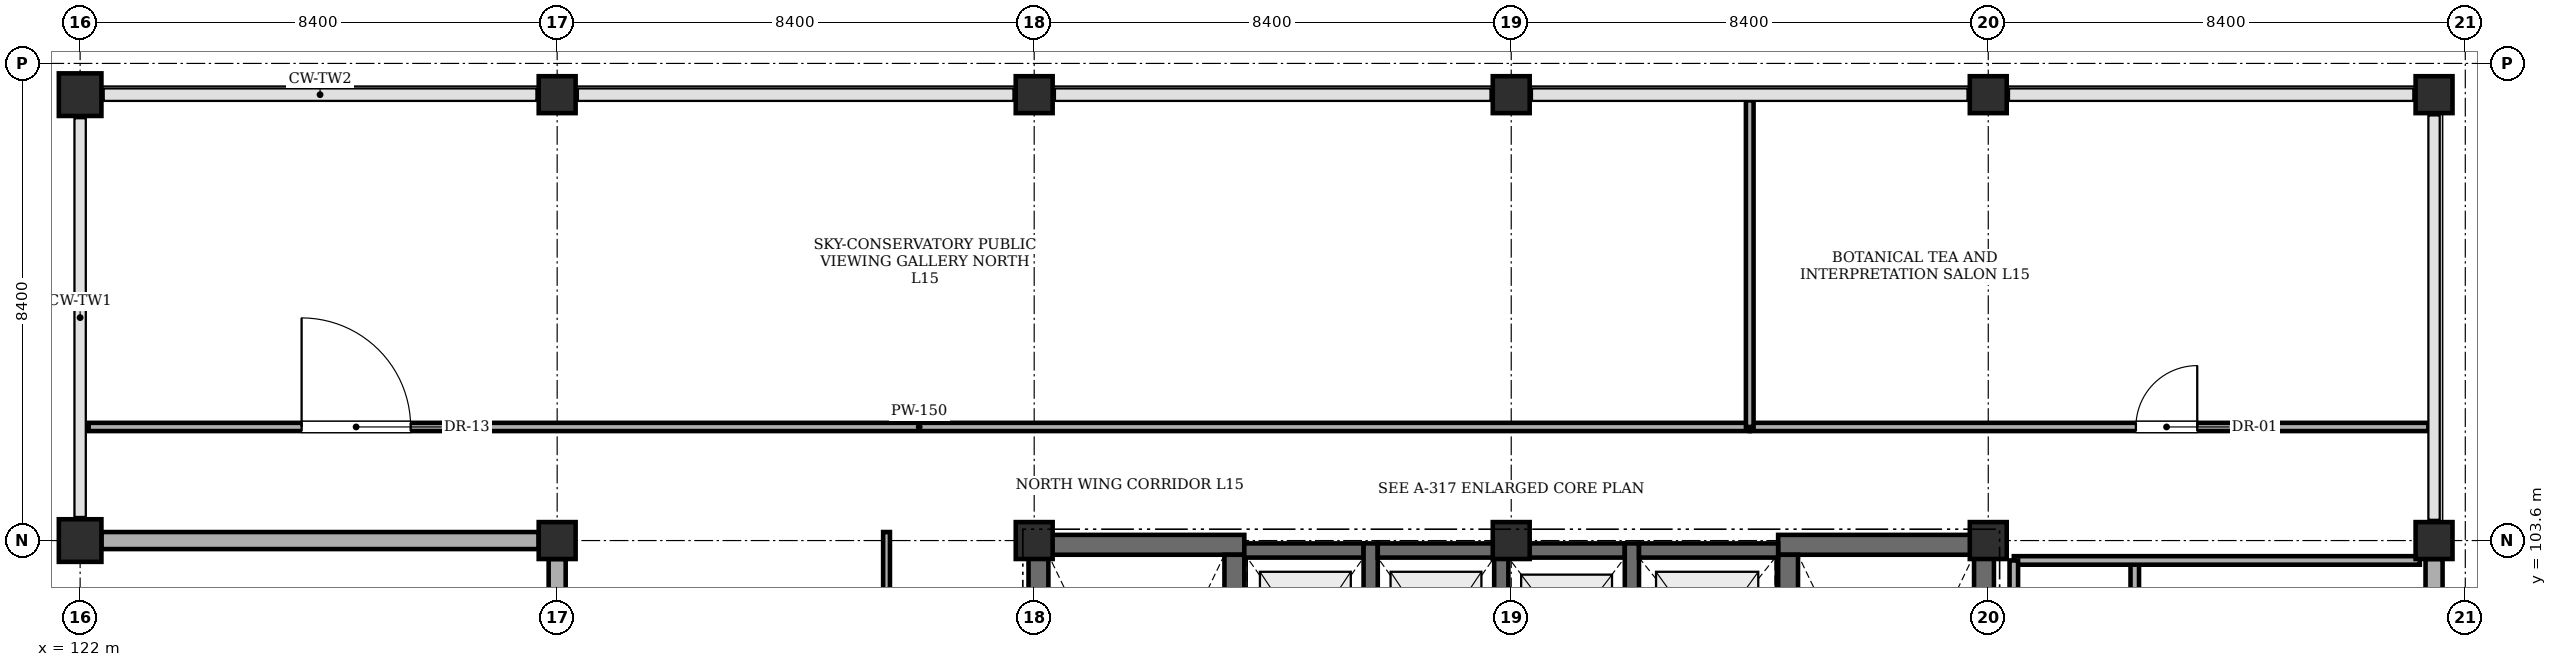
"""IFC4 building model, lengths in metres.
Left out: names, types, materials, properties, quantities, classifications, styles, units other than length and angle.
Written with IfcOpenShell. Run it as: python <this file> out.ifc"""

import sys

from ifc_helpers import new_model, si_unit, direction, frame, frame_2d, origin, origin_2d, place, context, subcontext, project, spatial, rectangle, extrude, element, fill, save


model = new_model("IFC4")
c1 = context("Model", 3, precision=1e-05, world=origin(), true_north=direction((0.0, 1.0)))
c2 = subcontext(c1, "Body", "Model", "MODEL_VIEW")
j1 = project(units=[si_unit("LENGTHUNIT", "METRE"), si_unit("PLANEANGLEUNIT", "RADIAN")], contexts=[c1])
p1 = place(None, origin())
s1 = spatial("IfcSite", under=j1, at=p1, CompositionType="ELEMENT")
p2 = place(p1, origin())
s2 = spatial("IfcBuilding", under=s1, at=p2, CompositionType="ELEMENT")
p3 = place(p2, frame((0.0, 0.0, 61.2)))
s3 = spatial("IfcBuildingStorey", under=s2, at=p3, CompositionType="ELEMENT", Elevation=61.2)
for number, where, z_axis, x_axis in (
    (1, (122.0, 103.6, 0.0), (0.0, 0.0, 1.0), (1.0, 0.0, 0.0)),
    (2, (122.0, 111.45, 0.0), (0.0, 0.0, 1.0), (1.0, 0.0, 0.0)),
):
    element("IfcColumn", number, at=place(p3, frame(where, z_axis=z_axis, x_axis=x_axis)), inside=s3, PredefinedType="COLUMN", context=c2, shape_type="SweptSolid", body=[
        extrude(rectangle(XDim=0.75, YDim=0.75, at=origin_2d()), origin(), (0.0, 0.0, 1.0), 4.28),
    ])
for number, where, z_axis, x_axis in (
    (3, (130.4, 103.6, 0.0), (0.0, 0.0, 1.0), (1.0, 0.0, 0.0)),
    (4, (130.4, 111.45, 0.0), (0.0, 0.0, 1.0), (1.0, 0.0, 0.0)),
    (5, (138.8, 103.6, 0.0), (0.0, 0.0, 1.0), (1.0, 0.0, 0.0)),
    (6, (138.8, 111.45, 0.0), (0.0, 0.0, 1.0), (1.0, 0.0, 0.0)),
    (7, (147.2, 103.6, 0.0), (0.0, 0.0, 1.0), (1.0, 0.0, 0.0)),
    (8, (147.2, 111.45, 0.0), (0.0, 0.0, 1.0), (1.0, 0.0, 0.0)),
    (9, (155.6, 103.6, 0.0), (0.0, 0.0, 1.0), (1.0, 0.0, 0.0)),
    (10, (155.6, 111.45, 0.0), (0.0, 0.0, 1.0), (1.0, 0.0, 0.0)),
    (11, (163.45, 103.6, 0.0), (0.0, 0.0, 1.0), (1.0, 0.0, 0.0)),
    (12, (163.45, 111.45, 0.0), (0.0, 0.0, 1.0), (1.0, 0.0, 0.0)),
):
    element("IfcColumn", number, at=place(p3, frame(where, z_axis=z_axis, x_axis=x_axis)), inside=s3, PredefinedType="COLUMN", context=c2, shape_type="SweptSolid", body=[
        extrude(rectangle(XDim=0.65, YDim=0.65, at=origin_2d()), origin(), (0.0, 0.0, 1.0), 4.28),
    ])
p4 = place(p3, frame((138.7, 103.525, 0.0), z_axis=(0.0, 0.0, 1.0), x_axis=(1.0, 0.0, 0.0)))
e13 = element("IfcWall", 13, at=p4, inside=s3, PredefinedType="SHEAR", context=c2, shape_type="SweptSolid", body=[
    extrude(rectangle(XDim=3.8, YDim=0.35, at=frame_2d((1.9, 0.0))), origin(), (0.0, 0.0, 1.0), 4.28),
])
p5 = place(p3, frame((138.875, 95.45, 0.0), z_axis=(0.0, 0.0, 1.0), x_axis=(0.0, 1.0, 0.0)))
e14 = element("IfcWall", 14, at=p5, inside=s3, PredefinedType="SHEAR", context=c2, shape_type="SweptSolid", body=[
    extrude(rectangle(XDim=7.9, YDim=0.35, at=frame_2d((3.95, 0.0))), origin(), (0.0, 0.0, 1.0), 4.28),
])
p6 = place(p3, frame((142.325, 95.45, 0.0), z_axis=(0.0, 0.0, 1.0), x_axis=(0.0, 1.0, 0.0)))
e15 = element("IfcWall", 15, at=p6, inside=s3, PredefinedType="SHEAR", context=c2, shape_type="SweptSolid", body=[
    extrude(rectangle(XDim=7.9, YDim=0.35, at=frame_2d((3.95, 0.0))), origin(), (0.0, 0.0, 1.0), 4.28),
])
p7 = place(p6, frame((0.22, 0.0, 0.0)))
e16 = element("IfcOpeningElement", 16, at=p7, cuts=e15, PredefinedType="OPENING", context=c2, shape_type="SweptSolid", body=[
    extrude(rectangle(XDim=1.15, YDim=2.15, at=frame_2d((0.575, 1.075))), frame((0.0, 0.185, 0.0), z_axis=(0.0, -1.0, 0.0), x_axis=(1.0, 0.0, 0.0)), (0.0, 0.0, 1.0), 0.37),
])
p8 = place(p3, frame((151.9, 103.525, 0.0), z_axis=(0.0, 0.0, 1.0), x_axis=(1.0, 0.0, 0.0)))
e17 = element("IfcWall", 17, at=p8, inside=s3, PredefinedType="SHEAR", context=c2, shape_type="SweptSolid", body=[
    extrude(rectangle(XDim=3.8, YDim=0.35, at=frame_2d((1.9, 0.0))), origin(), (0.0, 0.0, 1.0), 4.28),
])
p9 = place(p3, frame((152.075, 95.45, 0.0), z_axis=(0.0, 0.0, 1.0), x_axis=(0.0, 1.0, 0.0)))
e18 = element("IfcWall", 18, at=p9, inside=s3, PredefinedType="SHEAR", context=c2, shape_type="SweptSolid", body=[
    extrude(rectangle(XDim=7.9, YDim=0.35, at=frame_2d((3.95, 0.0))), origin(), (0.0, 0.0, 1.0), 4.28),
])
p10 = place(p9, frame((0.35, 0.0, 0.0)))
e19 = element("IfcOpeningElement", 19, at=p10, cuts=e18, PredefinedType="OPENING", context=c2, shape_type="SweptSolid", body=[
    extrude(rectangle(XDim=1.15, YDim=2.15, at=frame_2d((0.575, 1.075))), frame((0.0, 0.185, 0.0), z_axis=(0.0, -1.0, 0.0), x_axis=(1.0, 0.0, 0.0)), (0.0, 0.0, 1.0), 0.37),
])
p11 = place(p3, frame((155.525, 95.45, 0.0), z_axis=(0.0, 0.0, 1.0), x_axis=(0.0, 1.0, 0.0)))
e20 = element("IfcWall", 20, at=p11, inside=s3, PredefinedType="SHEAR", context=c2, shape_type="SweptSolid", body=[
    extrude(rectangle(XDim=7.9, YDim=0.35, at=frame_2d((3.95, 0.0))), origin(), (0.0, 0.0, 1.0), 4.28),
])
p12 = place(p3, frame((142.5, 103.425, 0.0), z_axis=(0.0, 0.0, 1.0), x_axis=(1.0, 0.0, 0.0)))
e21 = element("IfcWall", 21, at=p12, inside=s3, PredefinedType="SHEAR", context=c2, shape_type="SweptSolid", body=[
    extrude(rectangle(XDim=2.1, YDim=0.25, at=frame_2d((1.05, 0.0))), origin(), (0.0, 0.0, 1.0), 4.28),
])
p13 = place(p3, frame((144.725, 100.15, 0.0), z_axis=(0.0, 0.0, 1.0), x_axis=(0.0, 1.0, 0.0)))
e22 = element("IfcWall", 22, at=p13, inside=s3, PredefinedType="SHEAR", context=c2, shape_type="SweptSolid", body=[
    extrude(rectangle(XDim=3.4, YDim=0.25, at=frame_2d((1.7, 0.0))), origin(), (0.0, 0.0, 1.0), 4.28),
])
p14 = place(p3, frame((144.85, 103.425, 0.0), z_axis=(0.0, 0.0, 1.0), x_axis=(1.0, 0.0, 0.0)))
e23 = element("IfcWall", 23, at=p14, inside=s3, PredefinedType="SHEAR", context=c2, shape_type="SweptSolid", body=[
    extrude(rectangle(XDim=2.05, YDim=0.25, at=frame_2d((1.025, 0.0))), origin(), (0.0, 0.0, 1.0), 4.28),
])
p15 = place(p3, frame((147.025, 100.15, 0.0), z_axis=(0.0, 0.0, 1.0), x_axis=(0.0, 1.0, 0.0)))
e24 = element("IfcWall", 24, at=p15, inside=s3, PredefinedType="SHEAR", context=c2, shape_type="SweptSolid", body=[
    extrude(rectangle(XDim=3.4, YDim=0.25, at=frame_2d((1.7, 0.0))), origin(), (0.0, 0.0, 1.0), 4.28),
])
p16 = place(p3, frame((147.15, 103.425, 0.0), z_axis=(0.0, 0.0, 1.0), x_axis=(1.0, 0.0, 0.0)))
e25 = element("IfcWall", 25, at=p16, inside=s3, PredefinedType="SHEAR", context=c2, shape_type="SweptSolid", body=[
    extrude(rectangle(XDim=2.05, YDim=0.25, at=frame_2d((1.025, 0.0))), origin(), (0.0, 0.0, 1.0), 4.28),
])
p17 = place(p3, frame((149.325, 100.35, 0.0), z_axis=(0.0, 0.0, 1.0), x_axis=(0.0, 1.0, 0.0)))
e26 = element("IfcWall", 26, at=p17, inside=s3, PredefinedType="SHEAR", context=c2, shape_type="SweptSolid", body=[
    extrude(rectangle(XDim=3.2, YDim=0.25, at=frame_2d((1.6, 0.0))), origin(), (0.0, 0.0, 1.0), 4.28),
])
p18 = place(p3, frame((149.45, 103.425, 0.0), z_axis=(0.0, 0.0, 1.0), x_axis=(1.0, 0.0, 0.0)))
e27 = element("IfcWall", 27, at=p18, inside=s3, PredefinedType="SHEAR", context=c2, shape_type="SweptSolid", body=[
    extrude(rectangle(XDim=2.45, YDim=0.25, at=frame_2d((1.225, 0.0))), origin(), (0.0, 0.0, 1.0), 4.28),
])
p19 = place(p3, frame((163.45, 103.275, 0.0), z_axis=(0.0, 0.0, 1.0), x_axis=(0.0, -1.0, 0.0)))
e28 = element("IfcWall", 28, at=p19, inside=s3, PredefinedType="STANDARD", context=c2, shape_type="SweptSolid", body=[
    extrude(rectangle(XDim=7.75, YDim=0.3, at=frame_2d((3.875, 0.0))), origin(), (0.0, 0.0, 1.0), 3.58),
])
p20 = place(p19, frame((1.15, 0.0, 1.1)))
e29 = element("IfcOpeningElement", 29, at=p20, cuts=e28, PredefinedType="OPENING", context=c2, shape_type="SweptSolid", body=[
    extrude(rectangle(XDim=1.4, YDim=1.4, at=frame_2d((0.7, 0.7))), frame((0.0, 0.16, 0.0), z_axis=(0.0, -1.0, 0.0), x_axis=(1.0, 0.0, 0.0)), (0.0, 0.0, 1.0), 0.32),
])
p21 = place(p3, frame((130.4, 95.525, 0.0), z_axis=(0.0, 0.0, 1.0), x_axis=(0.0, 1.0, 0.0)))
e30 = element("IfcWall", 30, at=p21, inside=s3, PredefinedType="STANDARD", context=c2, shape_type="SweptSolid", body=[
    extrude(rectangle(XDim=7.75, YDim=0.3, at=frame_2d((3.875, 0.0))), origin(), (0.0, 0.0, 1.0), 3.58),
])
p22 = place(p21, frame((2.4, 0.0, 1.0)))
e31 = element("IfcOpeningElement", 31, at=p22, cuts=e30, PredefinedType="OPENING", context=c2, shape_type="SweptSolid", body=[
    extrude(rectangle(XDim=1.8, YDim=1.8, at=frame_2d((0.9, 0.9))), frame((0.0, 0.16, 0.0), z_axis=(0.0, -1.0, 0.0), x_axis=(1.0, 0.0, 0.0)), (0.0, 0.0, 1.0), 0.32),
])
p23 = place(p3, frame((130.075, 103.6, 0.0), z_axis=(0.0, 0.0, 1.0), x_axis=(-1.0, 0.0, 0.0)))
e32 = element("IfcWall", 32, at=p23, inside=s3, PredefinedType="STANDARD", context=c2, shape_type="SweptSolid", body=[
    extrude(rectangle(XDim=7.7, YDim=0.3, at=frame_2d((3.85, 0.0))), origin(), (0.0, 0.0, 1.0), 3.58),
])
p24 = place(p3, frame((158.18, 94.68, 0.0), z_axis=(0.0, 0.0, 1.0), x_axis=(0.0, 1.0, 0.0)))
e33 = element("IfcWall", 33, at=p24, inside=s3, PredefinedType="PARTITIONING", context=c2, shape_type="SweptSolid", body=[
    extrude(rectangle(XDim=8.57, YDim=0.15, at=frame_2d((4.285, 0.0))), origin(), (0.0, 0.0, 1.0), 4.28),
])
p25 = place(p24, frame((0.8, 0.0, 0.0)))
e34 = element("IfcOpeningElement", 34, at=p25, cuts=e33, PredefinedType="OPENING", context=c2, shape_type="SweptSolid", body=[
    extrude(rectangle(XDim=1.0, YDim=2.12, at=frame_2d((0.5, 1.06))), frame((0.0, 0.085, 0.0), z_axis=(0.0, -1.0, 0.0), x_axis=(1.0, 0.0, 0.0)), (0.0, 0.0, 1.0), 0.17),
])
p26 = place(p24, frame((3.5, 0.0, 0.0)))
e35 = element("IfcOpeningElement", 35, at=p26, cuts=e33, PredefinedType="OPENING", context=c2, shape_type="SweptSolid", body=[
    extrude(rectangle(XDim=0.92, YDim=2.1, at=frame_2d((0.46, 1.05))), frame((0.0, 0.085, 0.0), z_axis=(0.0, -1.0, 0.0), x_axis=(1.0, 0.0, 0.0)), (0.0, 0.0, 1.0), 0.17),
])
p27 = place(p24, frame((6.4, 0.0, 0.0)))
e36 = element("IfcOpeningElement", 36, at=p27, cuts=e33, PredefinedType="OPENING", context=c2, shape_type="SweptSolid", body=[
    extrude(rectangle(XDim=0.92, YDim=2.1, at=frame_2d((0.46, 1.05))), frame((0.0, 0.085, 0.0), z_axis=(0.0, -1.0, 0.0), x_axis=(1.0, 0.0, 0.0)), (0.0, 0.0, 1.0), 0.17),
])
p28 = place(p3, frame((156.05, 103.25, 0.0), z_axis=(0.0, 0.0, 1.0), x_axis=(1.0, 0.0, 0.0)))
e37 = element("IfcWall", 37, at=p28, inside=s3, PredefinedType="PARTITIONING", context=c2, shape_type="SweptSolid", body=[
    extrude(rectangle(XDim=7.15, YDim=0.15, at=frame_2d((3.575, 0.0))), origin(), (0.0, 0.0, 1.0), 4.28),
])
p29 = place(p3, frame((156.05, 94.68, 0.0), z_axis=(0.0, 0.0, 1.0), x_axis=(0.0, 1.0, 0.0)))
e38 = element("IfcWall", 38, at=p29, inside=s3, PredefinedType="PARTITIONING", context=c2, shape_type="SweptSolid", body=[
    extrude(rectangle(XDim=8.57, YDim=0.15, at=frame_2d((4.285, 0.0))), origin(), (0.0, 0.0, 1.0), 4.28),
])
p30 = place(p3, frame((136.2, 94.68, 0.0), z_axis=(0.0, 0.0, 1.0), x_axis=(0.0, 1.0, 0.0)))
e39 = element("IfcWall", 39, at=p30, inside=s3, PredefinedType="PARTITIONING", context=c2, shape_type="SweptSolid", body=[
    extrude(rectangle(XDim=9.07, YDim=0.12, at=frame_2d((4.535, 0.0))), origin(), (0.0, 0.0, 1.0), 4.28),
])
p31 = place(p3, frame((122.15, 105.6, 0.0), z_axis=(0.0, 0.0, 1.0), x_axis=(1.0, 0.0, 0.0)))
e40 = element("IfcWall", 40, at=p31, inside=s3, PredefinedType="PARTITIONING", context=c2, shape_type="SweptSolid", body=[
    extrude(rectangle(XDim=29.25, YDim=0.145, at=frame_2d((14.625, 0.0))), origin(), (0.0, 0.0, 1.0), 4.28),
])
p32 = place(p31, frame((3.75, 0.0, 0.0)))
e41 = element("IfcOpeningElement", 41, at=p32, cuts=e40, PredefinedType="OPENING", context=c2, shape_type="SweptSolid", body=[
    extrude(rectangle(XDim=1.92, YDim=2.28, at=frame_2d((0.96, 1.14))), frame((0.0, 0.083, 0.0), z_axis=(0.0, -1.0, 0.0), x_axis=(1.0, 0.0, 0.0)), (0.0, 0.0, 1.0), 0.165),
])
p33 = place(p3, frame((151.4, 105.6, 0.0), z_axis=(0.0, 0.0, 1.0), x_axis=(1.0, 0.0, 0.0)))
e42 = element("IfcWall", 42, at=p33, inside=s3, PredefinedType="PARTITIONING", context=c2, shape_type="SweptSolid", body=[
    extrude(rectangle(XDim=11.95, YDim=0.145, at=frame_2d((5.975, 0.0))), origin(), (0.0, 0.0, 1.0), 4.28),
])
p34 = place(p33, frame((6.8, 0.0, 0.0)))
e43 = element("IfcOpeningElement", 43, at=p34, cuts=e42, PredefinedType="OPENING", context=c2, shape_type="SweptSolid", body=[
    extrude(rectangle(XDim=1.08, YDim=2.15, at=frame_2d((0.54, 1.075))), frame((0.0, 0.083, 0.0), z_axis=(0.0, -1.0, 0.0), x_axis=(1.0, 0.0, 0.0)), (0.0, 0.0, 1.0), 0.165),
])
p35 = place(p3, frame((151.4, 105.6, 0.0), z_axis=(0.0, 0.0, 1.0), x_axis=(0.0, 1.0, 0.0)))
e44 = element("IfcWall", 44, at=p35, inside=s3, PredefinedType="PARTITIONING", context=c2, shape_type="SweptSolid", body=[
    extrude(rectangle(XDim=5.75, YDim=0.135, at=frame_2d((2.875, 0.0))), origin(), (0.0, 0.0, 1.0), 3.83),
])
p36 = place(p32, origin())
e45 = element("IfcDoor", 45, at=p36, inside=s3, OperationType="SINGLE_SWING_LEFT", PredefinedType="DOOR", context=c2, shape_type="SweptSolid", body=[
    extrude(rectangle(XDim=1.92, YDim=2.28, at=frame_2d((0.96, 1.14))), frame((0.0, 0.025, 0.0), z_axis=(0.0, -1.0, 0.0), x_axis=(1.0, 0.0, 0.0)), (0.0, 0.0, 1.0), 0.05),
])
fill(e41, e45)
p37 = place(p34, origin())
e46 = element("IfcDoor", 46, at=p37, inside=s3, OperationType="SINGLE_SWING_RIGHT", PredefinedType="DOOR", context=c2, shape_type="SweptSolid", body=[
    extrude(rectangle(XDim=1.08, YDim=2.15, at=frame_2d((0.54, 1.075))), frame((0.0, 0.025, 0.0), z_axis=(0.0, -1.0, 0.0), x_axis=(1.0, 0.0, 0.0)), (0.0, 0.0, 1.0), 0.05),
])
fill(e43, e46)
save(model, sys.argv[1])
